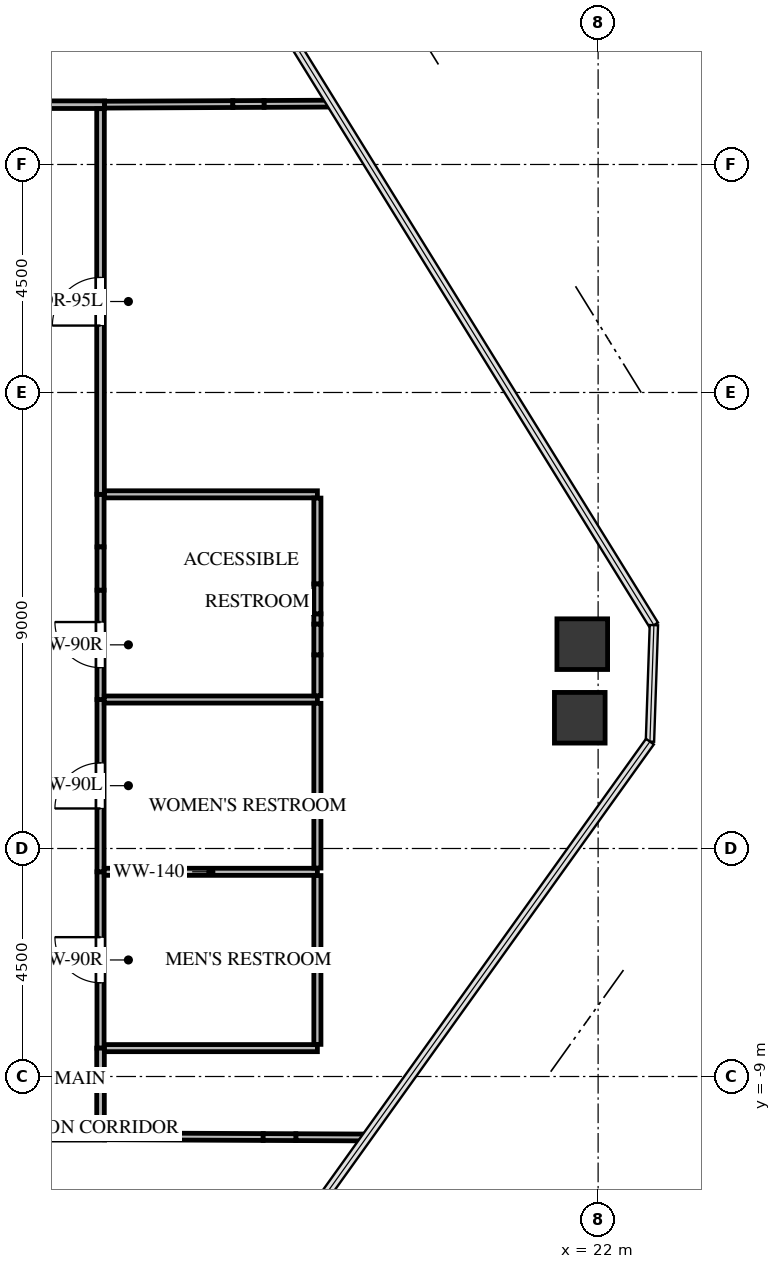
"""IFC4 building model, lengths in metres.
Left out: names, types, materials, properties, quantities, classifications, styles, units other than length and angle.
Written with IfcOpenShell. Run it as: python <this file> out.ifc"""

import sys

from ifc_helpers import new_model, si_unit, direction, frame, frame_2d, origin, origin_2d, place, context, subcontext, project, spatial, rectangle, extrude, source, transform, mapped, element, fill, save


model = new_model("IFC4")
c1 = context("Model", 3, precision=1e-05, world=origin(), true_north=direction((0.0, 1.0)))
c2 = subcontext(c1, "Body", "Model", "MODEL_VIEW")
j1 = project(units=[si_unit("LENGTHUNIT", "METRE"), si_unit("PLANEANGLEUNIT", "RADIAN")], contexts=[c1])
p1 = place(None, origin())
s1 = spatial("IfcSite", under=j1, at=p1, CompositionType="ELEMENT")
p2 = place(p1, origin())
s2 = spatial("IfcBuilding", under=s1, at=p2, CompositionType="ELEMENT")
p3 = place(p2, frame((0.0, 0.0, 200.2)))
s3 = spatial("IfcBuildingStorey", under=s2, at=p3, CompositionType="ELEMENT", Elevation=200.2)
m1 = source(origin(), c2, "Body", "SweptSolid", [
    extrude(rectangle(XDim=1.0, YDim=1.0, at=origin_2d()), origin(), (0.0, 0.0, 1.0), 3.0),
])
for number, where, z_axis, x_axis in (
    (1, (21.687, -0.467, -0.24), (0.0, 0.0, 1.0), (1.0, 0.0, 0.0)),
    (2, (21.638, -1.92, -0.24), (0.0, 0.0, 1.0), (1.0, 0.0, 0.0)),
):
    element("IfcColumn", number, at=place(p3, frame(where, z_axis=z_axis, x_axis=x_axis)), inside=s3, PredefinedType="COLUMN", context=c2, shape_type="MappedRepresentation", body=[
        mapped(m1, transform((0.0, 0.0, 0.0), x_axis=(1.0, 0.0, 0.0), y_axis=(0.0, 1.0, 0.0), z_axis=(0.0, 0.0, 1.0), scale=1.0)),
    ])
p4 = place(p3, frame((12.18, -8.44, 0.0), z_axis=(0.0, 0.0, 1.0), x_axis=(0.0, 1.0, 0.0)))
e3 = element("IfcWall", 3, at=p4, inside=s3, PredefinedType="PARTITIONING", context=c2, shape_type="SweptSolid", body=[
    extrude(rectangle(XDim=3.48, YDim=0.14, at=frame_2d((1.74, 0.0))), origin(), (0.0, 0.0, 1.0), 2.745),
])
p5 = place(p4, frame((1.29, 0.0, 0.0)))
e4 = element("IfcOpeningElement", 4, at=p5, cuts=e3, PredefinedType="OPENING", context=c2, shape_type="SweptSolid", body=[
    extrude(rectangle(XDim=0.9, YDim=2.05, at=frame_2d((0.45, 1.025))), frame((0.0, 0.08, 0.0), z_axis=(0.0, -1.0, 0.0), x_axis=(1.0, 0.0, 0.0)), (0.0, 0.0, 1.0), 0.16),
])
p6 = place(p3, frame((12.18, -4.96, 0.0), z_axis=(0.0, 0.0, 1.0), x_axis=(0.0, 1.0, 0.0)))
e5 = element("IfcWall", 5, at=p6, inside=s3, PredefinedType="PARTITIONING", context=c2, shape_type="SweptSolid", body=[
    extrude(rectangle(XDim=3.4, YDim=0.14, at=frame_2d((1.7, 0.0))), origin(), (0.0, 0.0, 1.0), 2.745),
])
p7 = place(p6, frame((1.25, 0.0, 0.0)))
e6 = element("IfcOpeningElement", 6, at=p7, cuts=e5, PredefinedType="OPENING", context=c2, shape_type="SweptSolid", body=[
    extrude(rectangle(XDim=0.9, YDim=2.05, at=frame_2d((0.45, 1.025))), frame((0.0, 0.08, 0.0), z_axis=(0.0, -1.0, 0.0), x_axis=(1.0, 0.0, 0.0)), (0.0, 0.0, 1.0), 0.16),
])
p8 = place(p3, frame((12.18, -1.56, 0.0), z_axis=(0.0, 0.0, 1.0), x_axis=(0.0, 1.0, 0.0)))
e7 = element("IfcWall", 7, at=p8, inside=s3, PredefinedType="PARTITIONING", context=c2, shape_type="SweptSolid", body=[
    extrude(rectangle(XDim=2.159, YDim=0.14, at=frame_2d((1.08, 0.0))), origin(), (0.0, 0.0, 1.0), 2.745),
])
p9 = place(p8, frame((0.629, 0.0, 0.0)))
e8 = element("IfcOpeningElement", 8, at=p9, cuts=e7, PredefinedType="OPENING", context=c2, shape_type="SweptSolid", body=[
    extrude(rectangle(XDim=0.9, YDim=2.05, at=frame_2d((0.45, 1.025))), frame((0.0, 0.08, 0.0), z_axis=(0.0, -1.0, 0.0), x_axis=(1.0, 0.0, 0.0)), (0.0, 0.0, 1.0), 0.16),
])
p10 = place(p3, frame((12.18, 1.452, 0.0), z_axis=(0.0, 0.0, 1.0), x_axis=(0.0, 1.0, 0.0)))
e9 = element("IfcWall", 9, at=p10, inside=s3, PredefinedType="PARTITIONING", context=c2, shape_type="SweptSolid", body=[
    extrude(rectangle(XDim=1.038, YDim=0.14, at=frame_2d((0.519, 0.0))), origin(), (0.0, 0.0, 1.0), 2.745),
])
p11 = place(p3, frame((12.18, 0.599, 0.0), z_axis=(0.0, 0.0, 1.0), x_axis=(0.0, 1.0, 0.0)))
e10 = element("IfcWall", 10, at=p11, inside=s3, PredefinedType="PARTITIONING", context=c2, shape_type="SweptSolid", body=[
    extrude(rectangle(XDim=0.853, YDim=0.14, at=frame_2d((0.427, 0.0))), origin(), (0.0, 0.0, 1.0), 1.942),
])
p12 = place(p3, frame((12.26, 10.18, 0.0), z_axis=(0.0, 0.0, 1.0), x_axis=(-1.0, 0.0, 0.0)))
e11 = element("IfcWall", 11, at=p12, inside=s3, PredefinedType="PARTITIONING", context=c2, shape_type="SweptSolid", body=[
    extrude(rectangle(XDim=1.114, YDim=0.15, at=frame_2d((0.557, 0.0))), origin(), (0.0, 0.0, 1.0), 2.745),
])
p13 = place(p3, frame((5.87, -10.18, 0.0), z_axis=(0.0, 0.0, 1.0), x_axis=(1.0, 0.0, 0.0)))
e12 = element("IfcWall", 12, at=p13, inside=s3, PredefinedType="PARTITIONING", context=c2, shape_type="SweptSolid", body=[
    extrude(rectangle(XDim=6.39, YDim=0.15, at=frame_2d((3.195, 0.0))), origin(), (0.0, 0.0, 1.0), 1.942),
])
p14 = place(p3, frame((12.18, 2.49, 0.0), z_axis=(0.0, 0.0, 1.0), x_axis=(0.0, 1.0, 0.0)))
e13 = element("IfcWall", 13, at=p14, inside=s3, PredefinedType="PARTITIONING", context=c2, shape_type="SweptSolid", body=[
    extrude(rectangle(XDim=7.611, YDim=0.15, at=frame_2d((3.806, 0.0))), origin(), (0.0, 0.0, 1.0), 2.745),
])
p15 = place(p14, frame((3.331, 0.0, 0.0)))
e14 = element("IfcOpeningElement", 14, at=p15, cuts=e13, PredefinedType="OPENING", context=c2, shape_type="SweptSolid", body=[
    extrude(rectangle(XDim=0.95, YDim=2.1, at=frame_2d((0.475, 1.05))), frame((0.0, 0.085, 0.0), z_axis=(0.0, -1.0, 0.0), x_axis=(1.0, 0.0, 0.0)), (0.0, 0.0, 1.0), 0.17),
])
p16 = place(p3, frame((12.18, -10.101, 0.0), z_axis=(0.0, 0.0, 1.0), x_axis=(0.0, 1.0, 0.0)))
e15 = element("IfcWall", 15, at=p16, inside=s3, PredefinedType="PARTITIONING", context=c2, shape_type="SweptSolid", body=[
    extrude(rectangle(XDim=1.661, YDim=0.15, at=frame_2d((0.831, 0.0))), origin(), (0.0, 0.0, 1.0), 2.745),
])
p17 = place(p3, frame((12.254, -4.96, 0.0), z_axis=(0.0, 0.0, 1.0), x_axis=(1.0, 0.0, 0.0)))
e16 = element("IfcWall", 16, at=p17, inside=s3, PredefinedType="PARTITIONING", context=c2, shape_type="SweptSolid", body=[
    extrude(rectangle(XDim=4.206, YDim=0.14, at=frame_2d((2.103, 0.0))), origin(), (0.0, 0.0, 1.0), 2.745),
])
p18 = place(p3, frame((16.46, -8.44, 0.0), z_axis=(0.0, 0.0, 1.0), x_axis=(-1.0, 0.0, 0.0)))
e17 = element("IfcWall", 17, at=p18, inside=s3, PredefinedType="PARTITIONING", context=c2, shape_type="SweptSolid", body=[
    extrude(rectangle(XDim=4.201, YDim=0.14, at=frame_2d((2.101, 0.0))), origin(), (0.0, 0.0, 1.0), 2.745),
])
p19 = place(p3, frame((16.46, -5.034, 0.0), z_axis=(0.0, 0.0, 1.0), x_axis=(0.0, -1.0, 0.0)))
e18 = element("IfcWall", 18, at=p19, inside=s3, PredefinedType="PARTITIONING", context=c2, shape_type="SweptSolid", body=[
    extrude(rectangle(XDim=3.332, YDim=0.14, at=frame_2d((1.666, 0.0))), origin(), (0.0, 0.0, 1.0), 2.745),
])
p20 = place(p3, frame((12.254, -1.56, 0.0), z_axis=(0.0, 0.0, 1.0), x_axis=(1.0, 0.0, 0.0)))
e19 = element("IfcWall", 19, at=p20, inside=s3, PredefinedType="PARTITIONING", context=c2, shape_type="SweptSolid", body=[
    extrude(rectangle(XDim=4.206, YDim=0.14, at=frame_2d((2.103, 0.0))), origin(), (0.0, 0.0, 1.0), 2.745),
])
p21 = place(p3, frame((16.46, -1.634, 0.0), z_axis=(0.0, 0.0, 1.0), x_axis=(0.0, -1.0, 0.0)))
e20 = element("IfcWall", 20, at=p21, inside=s3, PredefinedType="PARTITIONING", context=c2, shape_type="SweptSolid", body=[
    extrude(rectangle(XDim=3.252, YDim=0.14, at=frame_2d((1.626, 0.0))), origin(), (0.0, 0.0, 1.0), 2.745),
])
p22 = place(p3, frame((12.259, 2.49, 0.0), z_axis=(0.0, 0.0, 1.0), x_axis=(1.0, 0.0, 0.0)))
e21 = element("IfcWall", 21, at=p22, inside=s3, PredefinedType="PARTITIONING", context=c2, shape_type="SweptSolid", body=[
    extrude(rectangle(XDim=4.201, YDim=0.14, at=frame_2d((2.101, 0.0))), origin(), (0.0, 0.0, 1.0), 2.745),
])
p23 = place(p3, frame((16.46, 2.416, 0.0), z_axis=(0.0, 0.0, 1.0), x_axis=(0.0, -1.0, 0.0)))
e22 = element("IfcWall", 22, at=p23, inside=s3, PredefinedType="PARTITIONING", context=c2, shape_type="SweptSolid", body=[
    extrude(rectangle(XDim=1.696, YDim=0.14, at=frame_2d((0.848, 0.0))), origin(), (0.0, 0.0, 1.0), 2.745),
])
p24 = place(p3, frame((16.46, 0.131, 0.0), z_axis=(0.0, 0.0, 1.0), x_axis=(0.0, -1.0, 0.0)))
e23 = element("IfcWall", 23, at=p24, inside=s3, PredefinedType="PARTITIONING", context=c2, shape_type="SweptSolid", body=[
    extrude(rectangle(XDim=0.203, YDim=0.14, at=frame_2d((0.102, 0.0))), origin(), (0.0, 0.0, 1.0), 2.745),
])
p25 = place(p3, frame((16.46, -0.678, 0.0), z_axis=(0.0, 0.0, 1.0), x_axis=(0.0, -1.0, 0.0)))
e24 = element("IfcWall", 24, at=p25, inside=s3, PredefinedType="PARTITIONING", context=c2, shape_type="SweptSolid", body=[
    extrude(rectangle(XDim=0.808, YDim=0.14, at=frame_2d((0.404, 0.0))), origin(), (0.0, 0.0, 1.0), 2.745),
])
p26 = place(p3, frame((16.46, 0.72, 0.0), z_axis=(0.0, 0.0, 1.0), x_axis=(0.0, -1.0, 0.0)))
e25 = element("IfcWall", 25, at=p26, inside=s3, PredefinedType="PARTITIONING", context=c2, shape_type="SweptSolid", body=[
    extrude(rectangle(XDim=0.589, YDim=0.14, at=frame_2d((0.294, 0.0))), origin(), (0.0, 0.0, 1.0), 1.942),
])
p27 = place(p3, frame((16.46, -0.072, 0.0), z_axis=(0.0, 0.0, 1.0), x_axis=(0.0, -1.0, 0.0)))
e26 = element("IfcWall", 26, at=p27, inside=s3, PredefinedType="PARTITIONING", context=c2, shape_type="SweptSolid", body=[
    extrude(rectangle(XDim=0.606, YDim=0.14, at=frame_2d((0.303, 0.0))), origin(), (0.0, 0.0, 1.0), 1.942),
])
p28 = place(p3, frame((16.74, 10.201, 0.0), z_axis=(0.0, 0.0, 1.0), x_axis=(-0.999989521507, -0.004577868163, 0.0)))
e27 = element("IfcWall", 27, at=p28, inside=s3, PredefinedType="PARTITIONING", context=c2, shape_type="SweptSolid", body=[
    extrude(rectangle(XDim=1.333, YDim=0.135, at=frame_2d((0.667, 0.0))), origin(), (0.0, 0.0, 1.0), 2.745),
])
p29 = place(p3, frame((14.791, 10.192, 0.0), z_axis=(0.0, 0.0, 1.0), x_axis=(-0.999989725302, -0.004533132435, 0.0)))
e28 = element("IfcWall", 28, at=p29, inside=s3, PredefinedType="PARTITIONING", context=c2, shape_type="SweptSolid", body=[
    extrude(rectangle(XDim=2.531, YDim=0.135, at=frame_2d((1.266, 0.0))), origin(), (0.0, 0.0, 1.0), 2.745),
])
p30 = place(p3, frame((15.407, 10.195, 0.0), z_axis=(0.0, 0.0, 1.0), x_axis=(-0.999988671317, -0.004759961942, 0.0)))
e29 = element("IfcWall", 29, at=p30, inside=s3, PredefinedType="PARTITIONING", context=c2, shape_type="SweptSolid", body=[
    extrude(rectangle(XDim=0.615, YDim=0.135, at=frame_2d((0.308, 0.0))), origin(), (0.0, 0.0, 1.0), 2.099),
])
p31 = place(p3, frame((12.26, -10.18, 0.0), z_axis=(0.0, 0.0, 1.0), x_axis=(0.999990120522, -0.004445093728, 0.0)))
e30 = element("IfcWall", 30, at=p31, inside=s3, PredefinedType="PARTITIONING", context=c2, shape_type="SweptSolid", body=[
    extrude(rectangle(XDim=3.131, YDim=0.135, at=frame_2d((1.565, 0.0))), origin(), (0.0, 0.0, 1.0), 2.745),
])
p32 = place(p3, frame((16.034, -10.197, 0.0), z_axis=(0.0, 0.0, 1.0), x_axis=(0.999989640625, -0.004551773574, 0.0)))
e31 = element("IfcWall", 31, at=p32, inside=s3, PredefinedType="PARTITIONING", context=c2, shape_type="SweptSolid", body=[
    extrude(rectangle(XDim=1.395, YDim=0.135, at=frame_2d((0.697, 0.0))), origin(), (0.0, 0.0, 1.0), 2.745),
])
p33 = place(p3, frame((15.391, -10.194, 0.0), z_axis=(0.0, 0.0, 1.0), x_axis=(0.999991299796, -0.00417137061, 0.0)))
e32 = element("IfcWall", 32, at=p33, inside=s3, PredefinedType="PARTITIONING", context=c2, shape_type="SweptSolid", body=[
    extrude(rectangle(XDim=0.644, YDim=0.135, at=frame_2d((0.322, 0.0))), origin(), (0.0, 0.0, 1.0), 2.099),
])
m2 = source(origin(), c2, "Body", "SweptSolid", [
    extrude(rectangle(XDim=0.9, YDim=2.05, at=frame_2d((0.45, 1.025))), frame((0.0, 0.025, 0.0), z_axis=(0.0, -1.0, 0.0), x_axis=(1.0, 0.0, 0.0)), (0.0, 0.0, 1.0), 0.05),
])
p34 = place(p5, origin())
e33 = element("IfcDoor", 33, at=p34, inside=s3, OperationType="SINGLE_SWING_RIGHT", PredefinedType="DOOR", context=c2, shape_type="MappedRepresentation", body=[
    mapped(m2, transform((0.0, 0.0, 0.0), x_axis=(1.0, 0.0, 0.0), y_axis=(0.0, 1.0, 0.0), z_axis=(0.0, 0.0, 1.0), scale=1.0)),
])
fill(e4, e33)
m3 = source(origin(), c2, "Body", "SweptSolid", [
    extrude(rectangle(XDim=0.9, YDim=2.05, at=frame_2d((0.45, 1.025))), frame((0.0, 0.025, 0.0), z_axis=(0.0, -1.0, 0.0), x_axis=(1.0, 0.0, 0.0)), (0.0, 0.0, 1.0), 0.05),
])
p35 = place(p7, origin())
e34 = element("IfcDoor", 34, at=p35, inside=s3, OperationType="SINGLE_SWING_LEFT", PredefinedType="DOOR", context=c2, shape_type="MappedRepresentation", body=[
    mapped(m3, transform((0.0, 0.0, 0.0), x_axis=(1.0, 0.0, 0.0), y_axis=(0.0, 1.0, 0.0), z_axis=(0.0, 0.0, 1.0), scale=1.0)),
])
fill(e6, e34)
p36 = place(p9, origin())
e35 = element("IfcDoor", 35, at=p36, inside=s3, OperationType="SINGLE_SWING_RIGHT", PredefinedType="DOOR", context=c2, shape_type="MappedRepresentation", body=[
    mapped(m2, transform((0.0, 0.0, 0.0), x_axis=(1.0, 0.0, 0.0), y_axis=(0.0, 1.0, 0.0), z_axis=(0.0, 0.0, 1.0), scale=1.0)),
])
fill(e8, e35)
m4 = source(origin(), c2, "Body", "SweptSolid", [
    extrude(rectangle(XDim=0.95, YDim=2.1, at=frame_2d((0.475, 1.05))), frame((0.0, 0.025, 0.0), z_axis=(0.0, -1.0, 0.0), x_axis=(1.0, 0.0, 0.0)), (0.0, 0.0, 1.0), 0.05),
])
p37 = place(p15, origin())
e36 = element("IfcDoor", 36, at=p37, inside=s3, OperationType="SINGLE_SWING_LEFT", PredefinedType="DOOR", context=c2, shape_type="MappedRepresentation", body=[
    mapped(m4, transform((0.0, 0.0, 0.0), x_axis=(1.0, 0.0, 0.0), y_axis=(0.0, 1.0, 0.0), z_axis=(0.0, 0.0, 1.0), scale=1.0)),
])
fill(e14, e36)
save(model, sys.argv[1])
